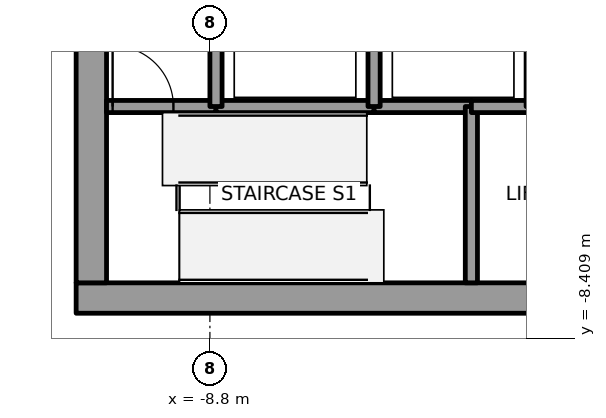
"""IFC4 building model, lengths in metres.
Left out: names, types, materials, properties, quantities, classifications, styles, units other than length and angle.
Written with IfcOpenShell. Run it as: python <this file> out.ifc"""

import sys

from ifc_helpers import new_model, si_unit, direction, frame, frame_2d, origin, place, context, subcontext, project, spatial, rectangle, extrude, element, fill, save


model = new_model("IFC4")
c1 = context("Model", 3, precision=1e-05, world=origin(), true_north=direction((0.0, 1.0)))
c2 = subcontext(c1, "Body", "Model", "MODEL_VIEW")
j1 = project(units=[si_unit("LENGTHUNIT", "METRE"), si_unit("PLANEANGLEUNIT", "RADIAN")], contexts=[c1])
p1 = place(None, origin())
s1 = spatial("IfcSite", under=j1, at=p1, CompositionType="ELEMENT")
p2 = place(p1, origin())
s2 = spatial("IfcBuilding", under=s1, at=p2, CompositionType="ELEMENT")
p3 = place(p2, frame((0.0, 0.0, 291.0)))
s3 = spatial("IfcBuildingStorey", under=s2, at=p3, CompositionType="ELEMENT", Elevation=291.0)
p4 = place(p3, frame((-11.0, -7.75, 0.0), z_axis=(0.0, 0.0, 1.0), x_axis=(1.0, 0.0, 0.0)))
e1 = element("IfcWall", 1, at=p4, inside=s3, PredefinedType="SHEAR", context=c2, shape_type="SweptSolid", body=[
    extrude(rectangle(XDim=22.0, YDim=0.5, at=frame_2d((11.0, 0.0))), origin(), (0.0, 0.0, 1.0), 4.0),
])
p5 = place(p4, frame((10.45, 0.0, 0.0)))
e2 = element("IfcOpeningElement", 2, at=p5, cuts=e1, PredefinedType="OPENING", context=c2, shape_type="SweptSolid", body=[
    extrude(rectangle(XDim=1.1, YDim=2.1, at=frame_2d((0.55, 1.05))), frame((0.0, 0.25, 0.0), z_axis=(0.0, -1.0, 0.0), x_axis=(1.0, 0.0, 0.0)), (0.0, 0.0, 1.0), 0.5),
])
p6 = place(p3, frame((-10.75, -7.5, 0.0), z_axis=(0.0, 0.0, 1.0), x_axis=(0.0, 1.0, 0.0)))
e3 = element("IfcWall", 3, at=p6, inside=s3, PredefinedType="SHEAR", context=c2, shape_type="SweptSolid", body=[
    extrude(rectangle(XDim=15.0, YDim=0.5, at=frame_2d((7.5, 0.0))), origin(), (0.0, 0.0, 1.0), 4.0),
])
p7 = place(p6, frame((6.6, 0.0, 0.0)))
e4 = element("IfcOpeningElement", 4, at=p7, cuts=e3, PredefinedType="OPENING", context=c2, shape_type="SweptSolid", body=[
    extrude(rectangle(XDim=1.8, YDim=2.1, at=frame_2d((0.9, 1.05))), frame((0.0, 0.25, 0.0), z_axis=(0.0, -1.0, 0.0), x_axis=(1.0, 0.0, 0.0)), (0.0, 0.0, 1.0), 0.5),
])
p8 = place(p3, frame((-10.5, -4.6, 0.0), z_axis=(0.0, 0.0, 1.0), x_axis=(1.0, 0.0, 0.0)))
e5 = element("IfcWall", 5, at=p8, inside=s3, PredefinedType="SOLIDWALL", context=c2, shape_type="SweptSolid", body=[
    extrude(rectangle(XDim=1.8, YDim=0.2, at=frame_2d((0.9, 0.0))), origin(), (0.0, 0.0, 1.0), 3.85),
])
p9 = place(p8, frame((0.1, 0.0, 0.0)))
e6 = element("IfcOpeningElement", 6, at=p9, cuts=e5, PredefinedType="OPENING", context=c2, shape_type="SweptSolid", body=[
    extrude(rectangle(XDim=1.0, YDim=2.1, at=frame_2d((0.5, 1.05))), frame((0.0, 0.1, 0.0), z_axis=(0.0, -1.0, 0.0), x_axis=(1.0, 0.0, 0.0)), (0.0, 0.0, 1.0), 0.2),
])
p10 = place(p3, frame((-8.7, -4.6, 0.0), z_axis=(0.0, 0.0, 1.0), x_axis=(1.0, 0.0, 0.0)))
e7 = element("IfcWall", 7, at=p10, inside=s3, PredefinedType="SOLIDWALL", context=c2, shape_type="SweptSolid", body=[
    extrude(rectangle(XDim=2.6, YDim=0.2, at=frame_2d((1.3, 0.0))), origin(), (0.0, 0.0, 1.0), 3.85),
])
p11 = place(p3, frame((-8.7, -4.6, 0.0), z_axis=(0.0, 0.0, 1.0), x_axis=(0.0, 1.0, 0.0)))
e8 = element("IfcWall", 8, at=p11, inside=s3, PredefinedType="SOLIDWALL", context=c2, shape_type="SweptSolid", body=[
    extrude(rectangle(XDim=2.8, YDim=0.2, at=frame_2d((1.4, 0.0))), origin(), (0.0, 0.0, 1.0), 3.85),
])
p12 = place(p3, frame((-6.1, -4.6, 0.0), z_axis=(0.0, 0.0, 1.0), x_axis=(1.0, 0.0, 0.0)))
e9 = element("IfcWall", 9, at=p12, inside=s3, PredefinedType="SOLIDWALL", context=c2, shape_type="SweptSolid", body=[
    extrude(rectangle(XDim=1.6, YDim=0.2, at=frame_2d((0.8, 0.0))), origin(), (0.0, 0.0, 1.0), 3.85),
])
p13 = place(p3, frame((-6.1, -4.6, 0.0), z_axis=(0.0, 0.0, 1.0), x_axis=(0.0, 1.0, 0.0)))
e10 = element("IfcWall", 10, at=p13, inside=s3, PredefinedType="SOLIDWALL", context=c2, shape_type="SweptSolid", body=[
    extrude(rectangle(XDim=2.8, YDim=0.2, at=frame_2d((1.4, 0.0))), origin(), (0.0, 0.0, 1.0), 3.85),
])
p14 = place(p3, frame((-4.5, -4.6, 0.0), z_axis=(0.0, 0.0, 1.0), x_axis=(0.0, -1.0, 0.0)))
e11 = element("IfcWall", 11, at=p14, inside=s3, PredefinedType="SOLIDWALL", context=c2, shape_type="SweptSolid", body=[
    extrude(rectangle(XDim=2.9, YDim=0.2, at=frame_2d((1.45, 0.0))), origin(), (0.0, 0.0, 1.0), 3.85),
])
p15 = place(p3, frame((-4.5, -4.6, 0.0), z_axis=(0.0, 0.0, 1.0), x_axis=(1.0, 0.0, 0.0)))
e12 = element("IfcWall", 12, at=p15, inside=s3, PredefinedType="SOLIDWALL", context=c2, shape_type="SweptSolid", body=[
    extrude(rectangle(XDim=1.0, YDim=0.2, at=frame_2d((0.5, 0.0))), origin(), (0.0, 0.0, 1.0), 3.85),
])
p16 = place(p9, origin())
e13 = element("IfcDoor", 13, at=p16, inside=s3, OperationType="SINGLE_SWING_LEFT", PredefinedType="DOOR", context=c2, shape_type="SweptSolid", body=[
    extrude(rectangle(XDim=1.0, YDim=2.1, at=frame_2d((0.5, 1.05))), frame((0.0, 0.025, 0.0), z_axis=(0.0, -1.0, 0.0), x_axis=(1.0, 0.0, 0.0)), (0.0, 0.0, 1.0), 0.05),
])
fill(e6, e13)
save(model, sys.argv[1])
